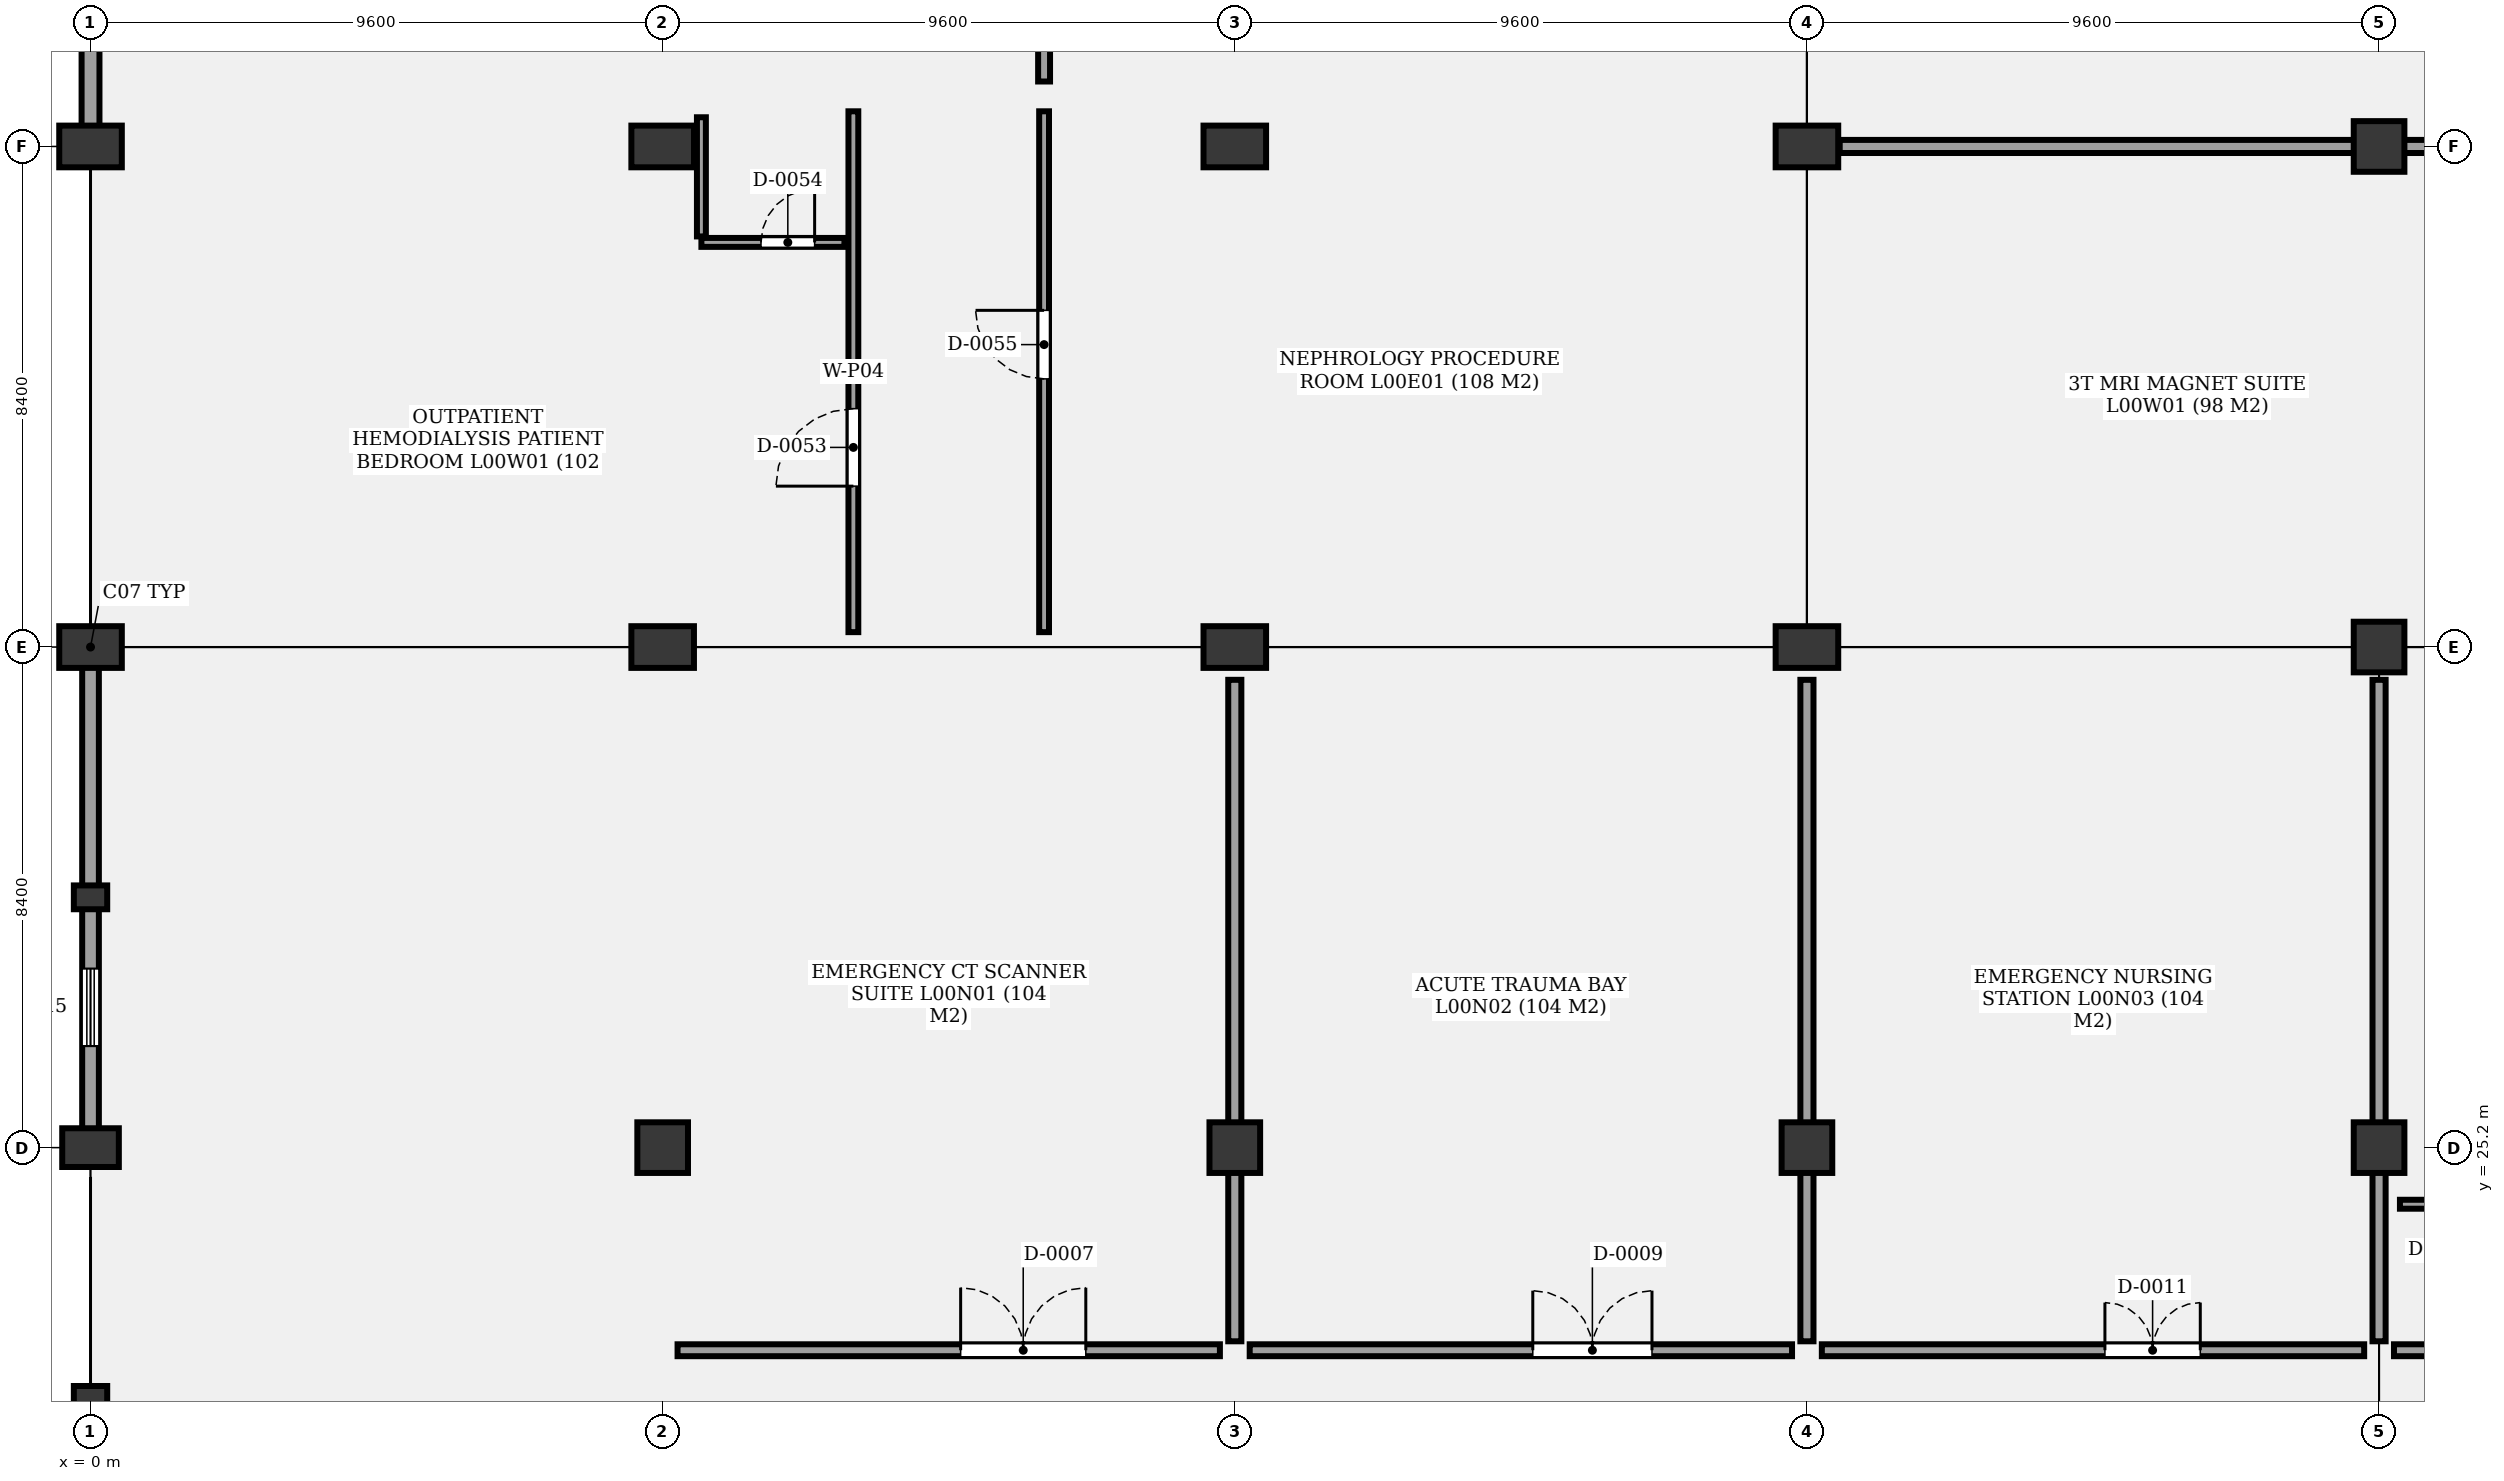
"""IFC4 building model, lengths in metres.
Left out: names, types, materials, properties, quantities, classifications, styles, units other than length and angle.
Written with IfcOpenShell. Run it as: python <this file> out.ifc"""

import sys

from ifc_helpers import new_model, si_unit, direction, frame, frame_2d, origin, origin_2d, place, context, subcontext, project, spatial, rectangle, extrude, element, fill, save


model = new_model("IFC4")
c1 = context("Model", 3, precision=1e-05, world=origin(), true_north=direction((0.0, 1.0)))
c2 = subcontext(c1, "Body", "Model", "MODEL_VIEW")
j1 = project(units=[si_unit("LENGTHUNIT", "METRE"), si_unit("PLANEANGLEUNIT", "RADIAN")], contexts=[c1])
p1 = place(None, origin())
s1 = spatial("IfcSite", under=j1, at=p1, CompositionType="ELEMENT")
p2 = place(p1, origin())
s2 = spatial("IfcBuilding", under=s1, at=p2, CompositionType="ELEMENT")
p3 = place(p2, origin())
s3 = spatial("IfcBuildingStorey", under=s2, at=p3, CompositionType="ELEMENT", Elevation=0.0)
p4 = place(p3, frame((0.0, 25.2, -0.35), z_axis=(0.0, 0.0, 1.0), x_axis=(0.0, 1.0, 0.0)))
e1 = element("IfcColumn", 1, at=p4, inside=s3, PredefinedType="COLUMN", context=c2, shape_type="SweptSolid", body=[
    extrude(rectangle(XDim=0.95, YDim=0.65, at=origin_2d()), origin(), (0.0, 0.0, 1.0), 5.45),
])
for number, where, z_axis, x_axis in (
    (2, (0.0, 33.6, -0.35), (0.0, 0.0, 1.0), (1.0, 0.0, 0.0)),
    (3, (0.0, 42.0, -0.35), (0.0, 0.0, 1.0), (1.0, 0.0, 0.0)),
):
    element("IfcColumn", number, at=place(p3, frame(where, z_axis=z_axis, x_axis=x_axis)), inside=s3, PredefinedType="COLUMN", context=c2, shape_type="SweptSolid", body=[
        extrude(rectangle(XDim=1.05, YDim=0.7, at=origin_2d()), origin(), (0.0, 0.0, 1.0), 5.45),
    ])
p5 = place(p3, frame((9.6, 25.2, -0.35), z_axis=(0.0, 0.0, 1.0), x_axis=(1.0, 0.0, 0.0)))
e4 = element("IfcColumn", 4, at=p5, inside=s3, PredefinedType="COLUMN", context=c2, shape_type="SweptSolid", body=[
    extrude(rectangle(XDim=0.85, YDim=0.85, at=origin_2d()), origin(), (0.0, 0.0, 1.0), 5.45),
])
for number, where, z_axis, x_axis in (
    (5, (9.6, 33.6, -0.35), (0.0, 0.0, 1.0), (1.0, 0.0, 0.0)),
    (6, (9.6, 42.0, -0.35), (0.0, 0.0, 1.0), (1.0, 0.0, 0.0)),
):
    element("IfcColumn", number, at=place(p3, frame(where, z_axis=z_axis, x_axis=x_axis)), inside=s3, PredefinedType="COLUMN", context=c2, shape_type="SweptSolid", body=[
        extrude(rectangle(XDim=1.05, YDim=0.7, at=origin_2d()), origin(), (0.0, 0.0, 1.0), 5.45),
    ])
p6 = place(p3, frame((19.2, 25.2, -0.35), z_axis=(0.0, 0.0, 1.0), x_axis=(1.0, 0.0, 0.0)))
e7 = element("IfcColumn", 7, at=p6, inside=s3, PredefinedType="COLUMN", context=c2, shape_type="SweptSolid", body=[
    extrude(rectangle(XDim=0.85, YDim=0.85, at=origin_2d()), origin(), (0.0, 0.0, 1.0), 5.45),
])
for number, where, z_axis, x_axis in (
    (8, (19.2, 33.6, -0.35), (0.0, 0.0, 1.0), (1.0, 0.0, 0.0)),
    (9, (19.2, 42.0, -0.35), (0.0, 0.0, 1.0), (1.0, 0.0, 0.0)),
):
    element("IfcColumn", number, at=place(p3, frame(where, z_axis=z_axis, x_axis=x_axis)), inside=s3, PredefinedType="COLUMN", context=c2, shape_type="SweptSolid", body=[
        extrude(rectangle(XDim=1.05, YDim=0.7, at=origin_2d()), origin(), (0.0, 0.0, 1.0), 5.45),
    ])
p7 = place(p3, frame((28.8, 25.2, -0.35), z_axis=(0.0, 0.0, 1.0), x_axis=(1.0, 0.0, 0.0)))
e10 = element("IfcColumn", 10, at=p7, inside=s3, PredefinedType="COLUMN", context=c2, shape_type="SweptSolid", body=[
    extrude(rectangle(XDim=0.85, YDim=0.85, at=origin_2d()), origin(), (0.0, 0.0, 1.0), 5.45),
])
for number, where, z_axis, x_axis in (
    (11, (28.8, 33.6, -0.35), (0.0, 0.0, 1.0), (1.0, 0.0, 0.0)),
    (12, (28.8, 42.0, -0.35), (0.0, 0.0, 1.0), (1.0, 0.0, 0.0)),
):
    element("IfcColumn", number, at=place(p3, frame(where, z_axis=z_axis, x_axis=x_axis)), inside=s3, PredefinedType="COLUMN", context=c2, shape_type="SweptSolid", body=[
        extrude(rectangle(XDim=1.05, YDim=0.7, at=origin_2d()), origin(), (0.0, 0.0, 1.0), 5.45),
    ])
for number, where, z_axis, x_axis in (
    (13, (38.4, 25.2, -0.35), (0.0, 0.0, 1.0), (1.0, 0.0, 0.0)),
    (14, (38.4, 33.6, -0.35), (0.0, 0.0, 1.0), (1.0, 0.0, 0.0)),
    (15, (38.4, 42.0, -0.35), (0.0, 0.0, 1.0), (1.0, 0.0, 0.0)),
):
    element("IfcColumn", number, at=place(p3, frame(where, z_axis=z_axis, x_axis=x_axis)), inside=s3, PredefinedType="COLUMN", context=c2, shape_type="SweptSolid", body=[
        extrude(rectangle(XDim=0.85, YDim=0.85, at=origin_2d()), origin(), (0.0, 0.0, 1.0), 5.45),
    ])
for number, where, z_axis, x_axis in (
    (16, (0.0, 21.0, 0.0), (0.0, 0.0, 1.0), (1.0, 0.0, 0.0)),
    (17, (0.0, 29.4, 0.0), (0.0, 0.0, 1.0), (1.0, 0.0, 0.0)),
):
    element("IfcColumn", number, at=place(p3, frame(where, z_axis=z_axis, x_axis=x_axis)), inside=s3, PredefinedType="PILASTER", context=c2, shape_type="SweptSolid", body=[
        extrude(rectangle(XDim=0.56, YDim=0.4, at=origin_2d()), origin(), (0.0, 0.0, 1.0), 5.1),
    ])
p8 = place(p3, frame((0.0, 25.2, 0.0), z_axis=(0.0, 0.0, 1.0), x_axis=(0.0, 1.0, 0.0)))
e18 = element("IfcWall", 18, at=p8, inside=s3, PredefinedType="SOLIDWALL", context=c2, shape_type="SweptSolid", body=[
    extrude(rectangle(XDim=8.4, YDim=0.28, at=frame_2d((4.2, 0.0))), origin(), (0.0, 0.0, 1.0), 4.24),
])
p9 = place(p8, frame((1.704, 0.0, 0.85)))
e19 = element("IfcOpeningElement", 19, at=p9, cuts=e18, PredefinedType="OPENING", context=c2, shape_type="SweptSolid", body=[
    extrude(rectangle(XDim=1.3, YDim=1.2, at=frame_2d((0.65, 0.6))), frame((0.0, 0.15, 0.0), z_axis=(0.0, -1.0, 0.0), x_axis=(1.0, 0.0, 0.0)), (0.0, 0.0, 1.0), 0.3),
])
p10 = place(p3, frame((0.0, 42.0, 0.0), z_axis=(0.0, 0.0, 1.0), x_axis=(0.0, 1.0, 0.0)))
e20 = element("IfcWall", 20, at=p10, inside=s3, PredefinedType="SOLIDWALL", context=c2, shape_type="SweptSolid", body=[
    extrude(rectangle(XDim=8.4, YDim=0.3, at=frame_2d((4.2, 0.0))), origin(), (0.0, 0.0, 1.0), 4.24),
])
p11 = place(p10, frame((3.1, 0.0, 0.0)))
e21 = element("IfcOpeningElement", 21, at=p11, cuts=e20, PredefinedType="OPENING", context=c2, shape_type="SweptSolid", body=[
    extrude(rectangle(XDim=2.2, YDim=2.5, at=frame_2d((1.1, 1.25))), frame((0.0, 0.16, 0.0), z_axis=(0.0, -1.0, 0.0), x_axis=(1.0, 0.0, 0.0)), (0.0, 0.0, 1.0), 0.32),
])
p12 = place(p3, frame((9.85, 21.8, 0.0), z_axis=(0.0, 0.0, 1.0), x_axis=(1.0, 0.0, 0.0)))
e22 = element("IfcWall", 22, at=p12, inside=s3, PredefinedType="PARTITIONING", context=c2, shape_type="SweptSolid", body=[
    extrude(rectangle(XDim=9.1, YDim=0.2, at=frame_2d((4.55, 0.0))), origin(), (0.0, 0.0, 1.0), 3.98),
])
p13 = place(p12, frame((4.75, 0.0, 0.0)))
e23 = element("IfcOpeningElement", 23, at=p13, cuts=e22, PredefinedType="OPENING", context=c2, shape_type="SweptSolid", body=[
    extrude(rectangle(XDim=2.1, YDim=2.4, at=frame_2d((1.05, 1.2))), frame((0.0, 0.11, 0.0), z_axis=(0.0, -1.0, 0.0), x_axis=(1.0, 0.0, 0.0)), (0.0, 0.0, 1.0), 0.22),
])
p14 = place(p3, frame((19.45, 21.8, 0.0), z_axis=(0.0, 0.0, 1.0), x_axis=(1.0, 0.0, 0.0)))
e24 = element("IfcWall", 24, at=p14, inside=s3, PredefinedType="PARTITIONING", context=c2, shape_type="SweptSolid", body=[
    extrude(rectangle(XDim=9.1, YDim=0.2, at=frame_2d((4.55, 0.0))), origin(), (0.0, 0.0, 1.0), 3.98),
])
p15 = place(p14, frame((4.75, 0.0, 0.0)))
e25 = element("IfcOpeningElement", 25, at=p15, cuts=e24, PredefinedType="OPENING", context=c2, shape_type="SweptSolid", body=[
    extrude(rectangle(XDim=2.0, YDim=2.4, at=frame_2d((1.0, 1.2))), frame((0.0, 0.11, 0.0), z_axis=(0.0, -1.0, 0.0), x_axis=(1.0, 0.0, 0.0)), (0.0, 0.0, 1.0), 0.22),
])
p16 = place(p3, frame((19.2, 21.95, 0.0), z_axis=(0.0, 0.0, 1.0), x_axis=(0.0, 1.0, 0.0)))
e26 = element("IfcWall", 26, at=p16, inside=s3, PredefinedType="PARTITIONING", context=c2, shape_type="SweptSolid", body=[
    extrude(rectangle(XDim=11.1, YDim=0.22, at=frame_2d((5.55, 0.0))), origin(), (0.0, 0.0, 1.0), 3.98),
])
p17 = place(p3, frame((29.05, 21.8, 0.0), z_axis=(0.0, 0.0, 1.0), x_axis=(1.0, 0.0, 0.0)))
e27 = element("IfcWall", 27, at=p17, inside=s3, PredefinedType="PARTITIONING", context=c2, shape_type="SweptSolid", body=[
    extrude(rectangle(XDim=9.1, YDim=0.2, at=frame_2d((4.55, 0.0))), origin(), (0.0, 0.0, 1.0), 3.98),
])
p18 = place(p17, frame((4.75, 0.0, 0.0)))
e28 = element("IfcOpeningElement", 28, at=p18, cuts=e27, PredefinedType="OPENING", context=c2, shape_type="SweptSolid", body=[
    extrude(rectangle(XDim=1.6, YDim=2.2, at=frame_2d((0.8, 1.1))), frame((0.0, 0.11, 0.0), z_axis=(0.0, -1.0, 0.0), x_axis=(1.0, 0.0, 0.0)), (0.0, 0.0, 1.0), 0.22),
])
p19 = place(p3, frame((28.8, 21.95, 0.0), z_axis=(0.0, 0.0, 1.0), x_axis=(0.0, 1.0, 0.0)))
e29 = element("IfcWall", 29, at=p19, inside=s3, PredefinedType="PARTITIONING", context=c2, shape_type="SweptSolid", body=[
    extrude(rectangle(XDim=11.1, YDim=0.22, at=frame_2d((5.55, 0.0))), origin(), (0.0, 0.0, 1.0), 3.98),
])
p20 = place(p3, frame((38.65, 21.8, 0.0), z_axis=(0.0, 0.0, 1.0), x_axis=(1.0, 0.0, 0.0)))
e30 = element("IfcWall", 30, at=p20, inside=s3, PredefinedType="PARTITIONING", context=c2, shape_type="SweptSolid", body=[
    extrude(rectangle(XDim=9.1, YDim=0.2, at=frame_2d((4.55, 0.0))), origin(), (0.0, 0.0, 1.0), 3.98),
])
p21 = place(p20, frame((4.75, 0.0, 0.0)))
e31 = element("IfcOpeningElement", 31, at=p21, cuts=e30, PredefinedType="OPENING", context=c2, shape_type="SweptSolid", body=[
    extrude(rectangle(XDim=1.25, YDim=2.2, at=frame_2d((0.625, 1.1))), frame((0.0, 0.11, 0.0), z_axis=(0.0, -1.0, 0.0), x_axis=(1.0, 0.0, 0.0)), (0.0, 0.0, 1.0), 0.22),
])
p22 = place(p3, frame((38.75, 24.25, 0.0), z_axis=(0.0, 0.0, 1.0), x_axis=(1.0, 0.0, 0.0)))
e32 = element("IfcWall", 32, at=p22, inside=s3, PredefinedType="PARTITIONING", context=c2, shape_type="SweptSolid", body=[
    extrude(rectangle(XDim=2.2, YDim=0.15, at=frame_2d((1.1, 0.0))), origin(), (0.0, 0.0, 1.0), 3.98),
])
p23 = place(p3, frame((38.4, 21.95, 0.0), z_axis=(0.0, 0.0, 1.0), x_axis=(0.0, 1.0, 0.0)))
e33 = element("IfcWall", 33, at=p23, inside=s3, PredefinedType="PARTITIONING", context=c2, shape_type="SweptSolid", body=[
    extrude(rectangle(XDim=11.1, YDim=0.22, at=frame_2d((5.55, 0.0))), origin(), (0.0, 0.0, 1.0), 3.98),
])
p24 = place(p3, frame((29.35, 42.0, 0.0), z_axis=(0.0, 0.0, 1.0), x_axis=(1.0, 0.0, 0.0)))
e34 = element("IfcWall", 34, at=p24, inside=s3, PredefinedType="PARTITIONING", context=c2, shape_type="SweptSolid", body=[
    extrude(rectangle(XDim=12.1, YDim=0.22, at=frame_2d((6.05, 0.0))), origin(), (0.0, 0.0, 1.0), 3.98),
])
p25 = place(p3, frame((12.8, 33.85, 0.0), z_axis=(0.0, 0.0, 1.0), x_axis=(0.0, 1.0, 0.0)))
e35 = element("IfcWall", 35, at=p25, inside=s3, PredefinedType="PARTITIONING", context=c2, shape_type="SweptSolid", body=[
    extrude(rectangle(XDim=8.74, YDim=0.165, at=frame_2d((4.37, 0.0))), origin(), (0.0, 0.0, 1.0), 3.98),
])
p26 = place(p25, frame((2.45, 0.0, 0.0)))
e36 = element("IfcOpeningElement", 36, at=p26, cuts=e35, PredefinedType="OPENING", context=c2, shape_type="SweptSolid", body=[
    extrude(rectangle(XDim=1.3, YDim=2.2, at=frame_2d((0.65, 1.1))), frame((0.0, 0.093, 0.0), z_axis=(0.0, -1.0, 0.0), x_axis=(1.0, 0.0, 0.0)), (0.0, 0.0, 1.0), 0.185),
])
p27 = place(p3, frame((10.25, 40.39, 0.0), z_axis=(0.0, 0.0, 1.0), x_axis=(1.0, 0.0, 0.0)))
e37 = element("IfcWall", 37, at=p27, inside=s3, PredefinedType="PARTITIONING", context=c2, shape_type="SweptSolid", body=[
    extrude(rectangle(XDim=2.4, YDim=0.15, at=frame_2d((1.2, 0.0))), origin(), (0.0, 0.0, 1.0), 3.98),
])
p28 = place(p27, frame((1.0, 0.0, 0.0)))
e38 = element("IfcOpeningElement", 38, at=p28, cuts=e37, PredefinedType="OPENING", context=c2, shape_type="SweptSolid", body=[
    extrude(rectangle(XDim=0.9, YDim=2.1, at=frame_2d((0.45, 1.05))), frame((0.0, 0.085, 0.0), z_axis=(0.0, -1.0, 0.0), x_axis=(1.0, 0.0, 0.0)), (0.0, 0.0, 1.0), 0.17),
])
p29 = place(p3, frame((10.25, 40.49, 0.0), z_axis=(0.0, 0.0, 1.0), x_axis=(0.0, 1.0, 0.0)))
e39 = element("IfcWall", 39, at=p29, inside=s3, PredefinedType="PARTITIONING", context=c2, shape_type="SweptSolid", body=[
    extrude(rectangle(XDim=2.0, YDim=0.15, at=frame_2d((1.0, 0.0))), origin(), (0.0, 0.0, 1.0), 3.98),
])
p30 = place(p3, frame((16.0, 33.85, 0.0), z_axis=(0.0, 0.0, 1.0), x_axis=(0.0, 1.0, 0.0)))
e40 = element("IfcWall", 40, at=p30, inside=s3, PredefinedType="PARTITIONING", context=c2, shape_type="SweptSolid", body=[
    extrude(rectangle(XDim=8.74, YDim=0.165, at=frame_2d((4.37, 0.0))), origin(), (0.0, 0.0, 1.0), 3.98),
])
p31 = place(p30, frame((4.25, 0.0, 0.0)))
e41 = element("IfcOpeningElement", 41, at=p31, cuts=e40, PredefinedType="OPENING", context=c2, shape_type="SweptSolid", body=[
    extrude(rectangle(XDim=1.15, YDim=2.2, at=frame_2d((0.575, 1.1))), frame((0.0, 0.093, 0.0), z_axis=(0.0, -1.0, 0.0), x_axis=(1.0, 0.0, 0.0)), (0.0, 0.0, 1.0), 0.185),
])
p32 = place(p3, frame((16.0, 43.09, 0.0), z_axis=(0.0, 0.0, 1.0), x_axis=(0.0, 1.0, 0.0)))
e42 = element("IfcWall", 42, at=p32, inside=s3, PredefinedType="PARTITIONING", context=c2, shape_type="SweptSolid", body=[
    extrude(rectangle(XDim=8.74, YDim=0.2, at=frame_2d((4.37, 0.0))), origin(), (0.0, 0.0, 1.0), 3.98),
])
p33 = place(p32, frame((3.25, 0.0, 0.0)))
e43 = element("IfcOpeningElement", 43, at=p33, cuts=e42, PredefinedType="OPENING", context=c2, shape_type="SweptSolid", body=[
    extrude(rectangle(XDim=1.6, YDim=2.2, at=frame_2d((0.8, 1.1))), frame((0.0, 0.11, 0.0), z_axis=(0.0, -1.0, 0.0), x_axis=(1.0, 0.0, 0.0)), (0.0, 0.0, 1.0), 0.22),
])
p34 = place(p9, origin())
e44 = element("IfcWindow", 44, at=p34, inside=s3, PartitioningType="SINGLE_PANEL", PredefinedType="WINDOW", context=c2, shape_type="SweptSolid", body=[
    extrude(rectangle(XDim=1.3, YDim=1.2, at=frame_2d((0.65, 0.6))), frame((0.0, 0.03, 0.0), z_axis=(0.0, -1.0, 0.0), x_axis=(1.0, 0.0, 0.0)), (0.0, 0.0, 1.0), 0.06),
])
fill(e19, e44)
p35 = place(p13, origin())
e45 = element("IfcDoor", 45, at=p35, inside=s3, OperationType="DOUBLE_DOOR_SINGLE_SWING", PredefinedType="DOOR", context=c2, shape_type="SweptSolid", body=[
    extrude(rectangle(XDim=2.1, YDim=2.4, at=frame_2d((1.05, 1.2))), frame((0.0, 0.025, 0.0), z_axis=(0.0, -1.0, 0.0), x_axis=(1.0, 0.0, 0.0)), (0.0, 0.0, 1.0), 0.05),
])
fill(e23, e45)
p36 = place(p15, origin())
e46 = element("IfcDoor", 46, at=p36, inside=s3, OperationType="DOUBLE_DOOR_SINGLE_SWING", PredefinedType="DOOR", context=c2, shape_type="SweptSolid", body=[
    extrude(rectangle(XDim=2.0, YDim=2.4, at=frame_2d((1.0, 1.2))), frame((0.0, 0.025, 0.0), z_axis=(0.0, -1.0, 0.0), x_axis=(1.0, 0.0, 0.0)), (0.0, 0.0, 1.0), 0.05),
])
fill(e25, e46)
p37 = place(p18, origin())
e47 = element("IfcDoor", 47, at=p37, inside=s3, OperationType="DOUBLE_DOOR_SINGLE_SWING", PredefinedType="DOOR", context=c2, shape_type="SweptSolid", body=[
    extrude(rectangle(XDim=1.6, YDim=2.2, at=frame_2d((0.8, 1.1))), frame((0.0, 0.025, 0.0), z_axis=(0.0, -1.0, 0.0), x_axis=(1.0, 0.0, 0.0)), (0.0, 0.0, 1.0), 0.05),
])
fill(e28, e47)
p38 = place(p26, origin())
e48 = element("IfcDoor", 48, at=p38, inside=s3, OperationType="SINGLE_SWING_LEFT", PredefinedType="DOOR", context=c2, shape_type="SweptSolid", body=[
    extrude(rectangle(XDim=1.3, YDim=2.2, at=frame_2d((0.65, 1.1))), frame((0.0, 0.025, 0.0), z_axis=(0.0, -1.0, 0.0), x_axis=(1.0, 0.0, 0.0)), (0.0, 0.0, 1.0), 0.05),
])
fill(e36, e48)
p39 = place(p28, origin())
e49 = element("IfcDoor", 49, at=p39, inside=s3, OperationType="SINGLE_SWING_RIGHT", PredefinedType="DOOR", context=c2, shape_type="SweptSolid", body=[
    extrude(rectangle(XDim=0.9, YDim=2.1, at=frame_2d((0.45, 1.05))), frame((0.0, 0.025, 0.0), z_axis=(0.0, -1.0, 0.0), x_axis=(1.0, 0.0, 0.0)), (0.0, 0.0, 1.0), 0.05),
])
fill(e38, e49)
p40 = place(p31, origin())
e50 = element("IfcDoor", 50, at=p40, inside=s3, OperationType="SINGLE_SWING_RIGHT", PredefinedType="DOOR", context=c2, shape_type="SweptSolid", body=[
    extrude(rectangle(XDim=1.15, YDim=2.2, at=frame_2d((0.575, 1.1))), frame((0.0, 0.025, 0.0), z_axis=(0.0, -1.0, 0.0), x_axis=(1.0, 0.0, 0.0)), (0.0, 0.0, 1.0), 0.05),
])
fill(e41, e50)
save(model, sys.argv[1])
